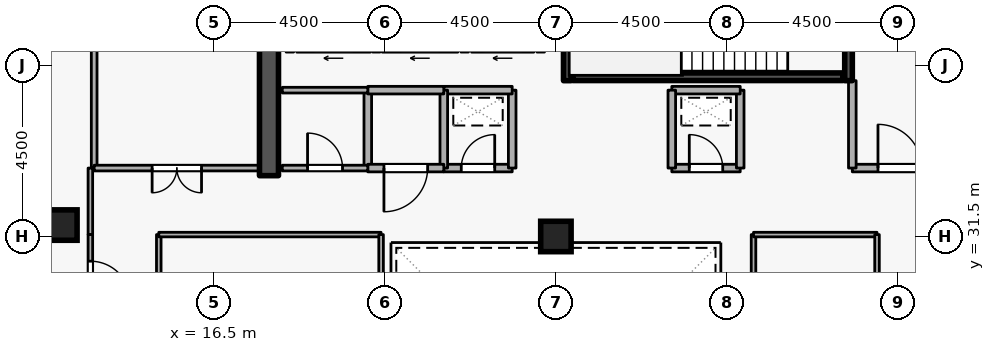
"""IFC4 building model, lengths in metres.
Left out: names, types, materials, properties, quantities, classifications, styles, units other than length and angle.
Written with IfcOpenShell. Run it as: python <this file> out.ifc"""

import sys

from ifc_helpers import new_model, si_unit, direction, frame, frame_2d, origin, origin_2d, place, context, subcontext, project, spatial, rectangle, extrude, element, fill, save


model = new_model("IFC4")
c1 = context("Model", 3, precision=1e-05, world=origin(), true_north=direction((0.0, 1.0)))
c2 = subcontext(c1, "Body", "Model", "MODEL_VIEW")
j1 = project(units=[si_unit("LENGTHUNIT", "METRE"), si_unit("PLANEANGLEUNIT", "RADIAN")], contexts=[c1])
p1 = place(None, origin())
s1 = spatial("IfcSite", under=j1, at=p1, CompositionType="ELEMENT")
p2 = place(p1, origin())
s2 = spatial("IfcBuilding", under=s1, at=p2, CompositionType="ELEMENT")
p3 = place(p2, frame((0.0, 0.0, 258.3)))
s3 = spatial("IfcBuildingStorey", under=s2, at=p3, CompositionType="ELEMENT", Elevation=258.3)
p4 = place(p3, frame((17.95, 33.1, 0.0), z_axis=(0.0, 0.0, 1.0), x_axis=(0.0, 1.0, 0.0)))
e1 = element("IfcWall", 1, at=p4, inside=s3, PredefinedType="SHEAR", context=c2, shape_type="SweptSolid", body=[
    extrude(rectangle(XDim=5.8, YDim=0.5, at=frame_2d((2.9, 0.0))), origin(), (0.0, 0.0, 1.0), 3.6),
])
for number, where, z_axis, x_axis in (
    (2, (12.5, 31.8, 0.0), (0.0, 0.0, 1.0), (1.0, 0.0, 0.0)),
    (3, (25.5, 31.5, 0.0), (0.0, 0.0, 1.0), (1.0, 0.0, 0.0)),
):
    element("IfcColumn", number, at=place(p3, frame(where, z_axis=z_axis, x_axis=x_axis)), inside=s3, PredefinedType="COLUMN", context=c2, shape_type="SweptSolid", body=[
        extrude(rectangle(XDim=0.8, YDim=0.8, at=origin_2d()), origin(), (0.0, 0.0, 1.0), 3.6),
    ])
p5 = place(p3, frame((24.92, 36.45, 0.0), z_axis=(0.0, 0.0, 1.0), x_axis=(-1.0, 0.0, 0.0)))
e4 = element("IfcWall", 4, at=p5, inside=s3, PredefinedType="STANDARD", context=c2, shape_type="SweptSolid", body=[
    extrude(rectangle(XDim=1.64, YDim=0.2, at=frame_2d((0.82, 0.0))), origin(), (0.0, 0.0, 1.0), 3.34),
])
p6 = place(p5, frame((0.31, 0.0, 0.0)))
e5 = element("IfcOpeningElement", 5, at=p6, cuts=e4, PredefinedType="OPENING", context=c2, shape_type="SweptSolid", body=[
    extrude(rectangle(XDim=1.02, YDim=2.06, at=frame_2d((0.51, 1.03))), frame((0.0, 0.11, 0.0), z_axis=(0.0, -1.0, 0.0), x_axis=(1.0, 0.0, 0.0)), (0.0, 0.0, 1.0), 0.22),
])
p7 = place(p3, frame((22.92, 36.45, 0.0), z_axis=(0.0, 0.0, 1.0), x_axis=(-1.0, 0.0, 0.0)))
e6 = element("IfcWall", 6, at=p7, inside=s3, PredefinedType="STANDARD", context=c2, shape_type="SweptSolid", body=[
    extrude(rectangle(XDim=1.99, YDim=0.2, at=frame_2d((0.995, 0.0))), origin(), (0.0, 0.0, 1.0), 3.34),
])
p8 = place(p7, frame((0.485, 0.0, 0.0)))
e7 = element("IfcOpeningElement", 7, at=p8, cuts=e6, PredefinedType="OPENING", context=c2, shape_type="SweptSolid", body=[
    extrude(rectangle(XDim=1.02, YDim=2.06, at=frame_2d((0.51, 1.03))), frame((0.0, 0.11, 0.0), z_axis=(0.0, -1.0, 0.0), x_axis=(1.0, 0.0, 0.0)), (0.0, 0.0, 1.0), 0.22),
])
p9 = place(p3, frame((20.62, 36.45, 0.0), z_axis=(0.0, 0.0, 1.0), x_axis=(-1.0, 0.0, 0.0)))
e8 = element("IfcWall", 8, at=p9, inside=s3, PredefinedType="STANDARD", context=c2, shape_type="SweptSolid", body=[
    extrude(rectangle(XDim=1.94, YDim=0.2, at=frame_2d((0.97, 0.0))), origin(), (0.0, 0.0, 1.0), 3.34),
])
p10 = place(p9, frame((0.46, 0.0, 0.0)))
e9 = element("IfcOpeningElement", 9, at=p10, cuts=e8, PredefinedType="OPENING", context=c2, shape_type="SweptSolid", body=[
    extrude(rectangle(XDim=1.02, YDim=2.06, at=frame_2d((0.51, 1.03))), frame((0.0, 0.11, 0.0), z_axis=(0.0, -1.0, 0.0), x_axis=(1.0, 0.0, 0.0)), (0.0, 0.0, 1.0), 0.22),
])
p11 = place(p3, frame((33.2, 38.95, 0.0), z_axis=(0.0, 0.0, 1.0), x_axis=(0.0, -1.0, 0.0)))
e10 = element("IfcWall", 10, at=p11, inside=s3, PredefinedType="SHEAR", context=c2, shape_type="SweptSolid", body=[
    extrude(rectangle(XDim=3.35, YDim=0.2, at=frame_2d((1.675, 0.0))), origin(), (0.0, 0.0, 1.0), 3.6),
])
p12 = place(p11, frame((1.125, 0.0, 0.0)))
e11 = element("IfcOpeningElement", 11, at=p12, cuts=e10, PredefinedType="OPENING", context=c2, shape_type="SweptSolid", body=[
    extrude(rectangle(XDim=1.1, YDim=2.1, at=frame_2d((0.55, 1.05))), frame((0.0, 0.11, 0.0), z_axis=(0.0, -1.0, 0.0), x_axis=(1.0, 0.0, 0.0)), (0.0, 0.0, 1.0), 0.22),
])
p13 = place(p3, frame((25.8, 35.6, 0.0), z_axis=(0.0, 0.0, 1.0), x_axis=(0.0, 1.0, 0.0)))
e12 = element("IfcWall", 12, at=p13, inside=s3, PredefinedType="SHEAR", context=c2, shape_type="SweptSolid", body=[
    extrude(rectangle(XDim=3.35, YDim=0.2, at=frame_2d((1.675, 0.0))), origin(), (0.0, 0.0, 1.0), 3.6),
])
p14 = place(p3, frame((25.95, 35.703, 0.0), z_axis=(0.0, 0.0, 1.0), x_axis=(1.0, 0.0, 0.0)))
e13 = element("IfcWall", 13, at=p14, inside=s3, PredefinedType="SHEAR", context=c2, shape_type="SweptSolid", body=[
    extrude(rectangle(XDim=7.1, YDim=0.2, at=frame_2d((3.55, 0.0))), origin(), (0.0, 0.0, 1.0), 3.6),
])
p15 = place(p3, frame((33.3, 33.3, 0.0), z_axis=(0.0, 0.0, 1.0), x_axis=(1.0, 0.0, 0.0)))
e14 = element("IfcWall", 14, at=p15, inside=s3, PredefinedType="STANDARD", context=c2, shape_type="SweptSolid", body=[
    extrude(rectangle(XDim=2.5, YDim=0.2, at=frame_2d((1.25, 0.0))), origin(), (0.0, 0.0, 1.0), 3.34),
])
p16 = place(p15, frame((0.675, 0.0, 0.0)))
e15 = element("IfcOpeningElement", 15, at=p16, cuts=e14, PredefinedType="OPENING", context=c2, shape_type="SweptSolid", body=[
    extrude(rectangle(XDim=1.15, YDim=2.1, at=frame_2d((0.575, 1.05))), frame((0.0, 0.11, 0.0), z_axis=(0.0, -1.0, 0.0), x_axis=(1.0, 0.0, 0.0)), (0.0, 0.0, 1.0), 0.22),
])
p17 = place(p3, frame((33.3, 35.6, 0.0), z_axis=(0.0, 0.0, 1.0), x_axis=(0.0, -1.0, 0.0)))
e16 = element("IfcWall", 16, at=p17, inside=s3, PredefinedType="STANDARD", context=c2, shape_type="SweptSolid", body=[
    extrude(rectangle(XDim=2.3, YDim=0.2, at=frame_2d((1.15, 0.0))), origin(), (0.0, 0.0, 1.0), 2.545),
])
p18 = place(p3, frame((22.55, 33.3, 0.0), z_axis=(0.0, 0.0, 1.0), x_axis=(1.0, 0.0, 0.0)))
e17 = element("IfcWall", 17, at=p18, inside=s3, PredefinedType="STANDARD", context=c2, shape_type="SweptSolid", body=[
    extrude(rectangle(XDim=1.8, YDim=0.2, at=frame_2d((0.9, 0.0))), origin(), (0.0, 0.0, 1.0), 3.34),
])
p19 = place(p18, frame((0.46, 0.0, 0.0)))
e18 = element("IfcOpeningElement", 18, at=p19, cuts=e17, PredefinedType="OPENING", context=c2, shape_type="SweptSolid", body=[
    extrude(rectangle(XDim=0.88, YDim=2.04, at=frame_2d((0.44, 1.02))), frame((0.0, 0.11, 0.0), z_axis=(0.0, -1.0, 0.0), x_axis=(1.0, 0.0, 0.0)), (0.0, 0.0, 1.0), 0.22),
])
p20 = place(p3, frame((24.35, 33.3, 0.0), z_axis=(0.0, 0.0, 1.0), x_axis=(0.0, 1.0, 0.0)))
e19 = element("IfcWall", 19, at=p20, inside=s3, PredefinedType="STANDARD", context=c2, shape_type="SweptSolid", body=[
    extrude(rectangle(XDim=2.05, YDim=0.2, at=frame_2d((1.025, 0.0))), origin(), (0.0, 0.0, 1.0), 3.34),
])
p21 = place(p3, frame((24.35, 35.35, 0.0), z_axis=(0.0, 0.0, 1.0), x_axis=(-1.0, 0.0, 0.0)))
e20 = element("IfcWall", 20, at=p21, inside=s3, PredefinedType="STANDARD", context=c2, shape_type="SweptSolid", body=[
    extrude(rectangle(XDim=1.8, YDim=0.2, at=frame_2d((0.9, 0.0))), origin(), (0.0, 0.0, 1.0), 3.34),
])
p22 = place(p3, frame((22.55, 35.35, 0.0), z_axis=(0.0, 0.0, 1.0), x_axis=(0.0, -1.0, 0.0)))
e21 = element("IfcWall", 21, at=p22, inside=s3, PredefinedType="STANDARD", context=c2, shape_type="SweptSolid", body=[
    extrude(rectangle(XDim=2.05, YDim=0.2, at=frame_2d((1.025, 0.0))), origin(), (0.0, 0.0, 1.0), 3.34),
])
p23 = place(p3, frame((28.55, 33.3, 0.0), z_axis=(0.0, 0.0, 1.0), x_axis=(1.0, 0.0, 0.0)))
e22 = element("IfcWall", 22, at=p23, inside=s3, PredefinedType="STANDARD", context=c2, shape_type="SweptSolid", body=[
    extrude(rectangle(XDim=1.8, YDim=0.2, at=frame_2d((0.9, 0.0))), origin(), (0.0, 0.0, 1.0), 3.34),
])
p24 = place(p23, frame((0.46, 0.0, 0.0)))
e23 = element("IfcOpeningElement", 23, at=p24, cuts=e22, PredefinedType="OPENING", context=c2, shape_type="SweptSolid", body=[
    extrude(rectangle(XDim=0.88, YDim=2.04, at=frame_2d((0.44, 1.02))), frame((0.0, 0.11, 0.0), z_axis=(0.0, -1.0, 0.0), x_axis=(1.0, 0.0, 0.0)), (0.0, 0.0, 1.0), 0.22),
])
p25 = place(p3, frame((30.35, 33.3, 0.0), z_axis=(0.0, 0.0, 1.0), x_axis=(0.0, 1.0, 0.0)))
e24 = element("IfcWall", 24, at=p25, inside=s3, PredefinedType="STANDARD", context=c2, shape_type="SweptSolid", body=[
    extrude(rectangle(XDim=2.05, YDim=0.2, at=frame_2d((1.025, 0.0))), origin(), (0.0, 0.0, 1.0), 3.34),
])
p26 = place(p3, frame((30.35, 35.35, 0.0), z_axis=(0.0, 0.0, 1.0), x_axis=(-1.0, 0.0, 0.0)))
e25 = element("IfcWall", 25, at=p26, inside=s3, PredefinedType="STANDARD", context=c2, shape_type="SweptSolid", body=[
    extrude(rectangle(XDim=1.8, YDim=0.2, at=frame_2d((0.9, 0.0))), origin(), (0.0, 0.0, 1.0), 3.34),
])
for number, where, z_axis, x_axis in (
    (26, (28.55, 35.35, 0.0), (0.0, 0.0, 1.0), (0.0, -1.0, 0.0)),
    (27, (20.55, 33.3, 0.0), (0.0, 0.0, 1.0), (0.0, 1.0, 0.0)),
):
    element("IfcWall", number, at=place(p3, frame(where, z_axis=z_axis, x_axis=x_axis)), inside=s3, PredefinedType="STANDARD", context=c2, shape_type="SweptSolid", body=[
        extrude(rectangle(XDim=2.05, YDim=0.2, at=frame_2d((1.025, 0.0))), origin(), (0.0, 0.0, 1.0), 3.34),
    ])
p27 = place(p3, frame((20.55, 35.35, 0.0), z_axis=(0.0, 0.0, 1.0), x_axis=(1.0, 0.0, 0.0)))
e28 = element("IfcWall", 28, at=p27, inside=s3, PredefinedType="STANDARD", context=c2, shape_type="SweptSolid", body=[
    extrude(rectangle(XDim=2.0, YDim=0.2, at=frame_2d((1.0, 0.0))), origin(), (0.0, 0.0, 1.0), 3.34),
])
p28 = place(p3, frame((22.55, 33.3, 0.0), z_axis=(0.0, 0.0, 1.0), x_axis=(-1.0, 0.0, 0.0)))
e29 = element("IfcWall", 29, at=p28, inside=s3, PredefinedType="STANDARD", context=c2, shape_type="SweptSolid", body=[
    extrude(rectangle(XDim=2.0, YDim=0.2, at=frame_2d((1.0, 0.0))), origin(), (0.0, 0.0, 1.0), 3.34),
])
p29 = place(p28, frame((0.425, 0.0, 0.0)))
e30 = element("IfcOpeningElement", 30, at=p29, cuts=e29, PredefinedType="OPENING", context=c2, shape_type="SweptSolid", body=[
    extrude(rectangle(XDim=1.15, YDim=2.1, at=frame_2d((0.575, 1.05))), frame((0.0, 0.11, 0.0), z_axis=(0.0, -1.0, 0.0), x_axis=(1.0, 0.0, 0.0)), (0.0, 0.0, 1.0), 0.22),
])
p30 = place(p3, frame((18.3, 33.3, 0.0), z_axis=(0.0, 0.0, 1.0), x_axis=(1.0, 0.0, 0.0)))
e31 = element("IfcWall", 31, at=p30, inside=s3, PredefinedType="PARTITIONING", context=c2, shape_type="SweptSolid", body=[
    extrude(rectangle(XDim=2.25, YDim=0.15, at=frame_2d((1.125, 0.0))), origin(), (0.0, 0.0, 1.0), 3.34),
])
p31 = place(p30, frame((0.665, 0.0, 0.0)))
e32 = element("IfcOpeningElement", 32, at=p31, cuts=e31, PredefinedType="OPENING", context=c2, shape_type="SweptSolid", body=[
    extrude(rectangle(XDim=0.92, YDim=2.08, at=frame_2d((0.46, 1.04))), frame((0.0, 0.085, 0.0), z_axis=(0.0, -1.0, 0.0), x_axis=(1.0, 0.0, 0.0)), (0.0, 0.0, 1.0), 0.17),
])
p32 = place(p3, frame((20.55, 35.35, 0.0), z_axis=(0.0, 0.0, 1.0), x_axis=(-1.0, 0.0, 0.0)))
e33 = element("IfcWall", 33, at=p32, inside=s3, PredefinedType="PARTITIONING", context=c2, shape_type="SweptSolid", body=[
    extrude(rectangle(XDim=2.25, YDim=0.15, at=frame_2d((1.125, 0.0))), origin(), (0.0, 0.0, 1.0), 3.34),
])
p33 = place(p3, frame((13.35, 33.3, 0.0), z_axis=(0.0, 0.0, 1.0), x_axis=(0.0, 1.0, 0.0)))
e34 = element("IfcWall", 34, at=p33, inside=s3, PredefinedType="PARTITIONING", context=c2, shape_type="SweptSolid", body=[
    extrude(rectangle(XDim=11.42, YDim=0.15, at=frame_2d((5.71, 0.0))), origin(), (0.0, 0.0, 1.0), 3.34),
])
p34 = place(p3, frame((17.7, 33.3, 0.0), z_axis=(0.0, 0.0, 1.0), x_axis=(-1.0, 0.0, 0.0)))
e35 = element("IfcWall", 35, at=p34, inside=s3, PredefinedType="PARTITIONING", context=c2, shape_type="SweptSolid", body=[
    extrude(rectangle(XDim=4.35, YDim=0.15, at=frame_2d((2.175, 0.0))), origin(), (0.0, 0.0, 1.0), 3.34),
])
p35 = place(p34, frame((1.525, 0.0, 0.0)))
e36 = element("IfcOpeningElement", 36, at=p35, cuts=e35, PredefinedType="OPENING", context=c2, shape_type="SweptSolid", body=[
    extrude(rectangle(XDim=1.3, YDim=2.12, at=frame_2d((0.65, 1.06))), frame((0.0, 0.085, 0.0), z_axis=(0.0, -1.0, 0.0), x_axis=(1.0, 0.0, 0.0)), (0.0, 0.0, 1.0), 0.17),
])
p36 = place(p3, frame((13.25, 33.3, 0.0), z_axis=(0.0, 0.0, 1.0), x_axis=(0.0, -1.0, 0.0)))
e37 = element("IfcWall", 37, at=p36, inside=s3, PredefinedType="PARTITIONING", context=c2, shape_type="SweptSolid", body=[
    extrude(rectangle(XDim=1.75, YDim=0.12, at=frame_2d((0.875, 0.0))), origin(), (0.0, 0.0, 1.0), 3.34),
])
p37 = place(p3, frame((13.25, 31.55, 0.0), z_axis=(0.0, 0.0, 1.0), x_axis=(0.0, -1.0, 0.0)))
e38 = element("IfcWall", 38, at=p37, inside=s3, PredefinedType="PARTITIONING", context=c2, shape_type="SweptSolid", body=[
    extrude(rectangle(XDim=2.45, YDim=0.12, at=frame_2d((1.225, 0.0))), origin(), (0.0, 0.0, 1.0), 3.34),
])
p38 = place(p37, frame((0.7, 0.0, 0.0)))
e39 = element("IfcOpeningElement", 39, at=p38, cuts=e38, PredefinedType="OPENING", context=c2, shape_type="SweptSolid", body=[
    extrude(rectangle(XDim=1.05, YDim=2.1, at=frame_2d((0.525, 1.05))), frame((0.0, 0.07, 0.0), z_axis=(0.0, -1.0, 0.0), x_axis=(1.0, 0.0, 0.0)), (0.0, 0.0, 1.0), 0.14),
])
p39 = place(p3, frame((15.05, 22.45, 0.0), z_axis=(0.0, 0.0, 1.0), x_axis=(0.0, 1.0, 0.0)))
e40 = element("IfcWall", 40, at=p39, inside=s3, PredefinedType="PARTITIONING", context=c2, shape_type="SweptSolid", body=[
    extrude(rectangle(XDim=9.1, YDim=0.12, at=frame_2d((4.55, 0.0))), origin(), (0.0, 0.0, 1.0), 3.34),
])
p40 = place(p39, frame((4.075, 0.0, 0.0)))
e41 = element("IfcOpeningElement", 41, at=p40, cuts=e40, PredefinedType="OPENING", context=c2, shape_type="SweptSolid", body=[
    extrude(rectangle(XDim=0.95, YDim=2.1, at=frame_2d((0.475, 1.05))), frame((0.0, 0.07, 0.0), z_axis=(0.0, -1.0, 0.0), x_axis=(1.0, 0.0, 0.0)), (0.0, 0.0, 1.0), 0.14),
])
p41 = place(p3, frame((15.05, 31.55, 0.0), z_axis=(0.0, 0.0, 1.0), x_axis=(1.0, 0.0, 0.0)))
e42 = element("IfcWall", 42, at=p41, inside=s3, PredefinedType="PARTITIONING", context=c2, shape_type="SweptSolid", body=[
    extrude(rectangle(XDim=5.85, YDim=0.12, at=frame_2d((2.925, 0.0))), origin(), (0.0, 0.0, 1.0), 3.34),
])
for number, where, z_axis, x_axis in (
    (43, (20.9, 31.55, 0.0), (0.0, 0.0, 1.0), (0.0, -1.0, 0.0)),
    (44, (30.7, 22.45, 0.0), (0.0, 0.0, 1.0), (0.0, 1.0, 0.0)),
):
    element("IfcWall", number, at=place(p3, frame(where, z_axis=z_axis, x_axis=x_axis)), inside=s3, PredefinedType="PARTITIONING", context=c2, shape_type="SweptSolid", body=[
        extrude(rectangle(XDim=9.1, YDim=0.12, at=frame_2d((4.55, 0.0))), origin(), (0.0, 0.0, 1.0), 3.34),
    ])
p42 = place(p3, frame((30.7, 31.55, 0.0), z_axis=(0.0, 0.0, 1.0), x_axis=(1.0, 0.0, 0.0)))
e45 = element("IfcWall", 45, at=p42, inside=s3, PredefinedType="PARTITIONING", context=c2, shape_type="SweptSolid", body=[
    extrude(rectangle(XDim=3.25, YDim=0.12, at=frame_2d((1.625, 0.0))), origin(), (0.0, 0.0, 1.0), 3.34),
])
p43 = place(p3, frame((33.95, 31.55, 0.0), z_axis=(0.0, 0.0, 1.0), x_axis=(0.0, -1.0, 0.0)))
e46 = element("IfcWall", 46, at=p43, inside=s3, PredefinedType="PARTITIONING", context=c2, shape_type="SweptSolid", body=[
    extrude(rectangle(XDim=9.1, YDim=0.12, at=frame_2d((4.55, 0.0))), origin(), (0.0, 0.0, 1.0), 3.34),
])
p44 = place(p43, frame((4.075, 0.0, 0.0)))
e47 = element("IfcOpeningElement", 47, at=p44, cuts=e46, PredefinedType="OPENING", context=c2, shape_type="SweptSolid", body=[
    extrude(rectangle(XDim=0.95, YDim=2.1, at=frame_2d((0.475, 1.05))), frame((0.0, 0.07, 0.0), z_axis=(0.0, -1.0, 0.0), x_axis=(1.0, 0.0, 0.0)), (0.0, 0.0, 1.0), 0.14),
])
p45 = place(p16, origin())
e48 = element("IfcDoor", 48, at=p45, inside=s3, OperationType="SINGLE_SWING_LEFT", PredefinedType="DOOR", context=c2, shape_type="SweptSolid", body=[
    extrude(rectangle(XDim=1.15, YDim=2.1, at=frame_2d((0.575, 1.05))), frame((0.0, 0.025, 0.0), z_axis=(0.0, -1.0, 0.0), x_axis=(1.0, 0.0, 0.0)), (0.0, 0.0, 1.0), 0.05),
])
fill(e15, e48)
p46 = place(p19, origin())
e49 = element("IfcDoor", 49, at=p46, inside=s3, OperationType="SINGLE_SWING_RIGHT", PredefinedType="DOOR", context=c2, shape_type="SweptSolid", body=[
    extrude(rectangle(XDim=0.88, YDim=2.04, at=frame_2d((0.44, 1.02))), frame((0.0, 0.025, 0.0), z_axis=(0.0, -1.0, 0.0), x_axis=(1.0, 0.0, 0.0)), (0.0, 0.0, 1.0), 0.05),
])
fill(e18, e49)
p47 = place(p24, origin())
e50 = element("IfcDoor", 50, at=p47, inside=s3, OperationType="SINGLE_SWING_LEFT", PredefinedType="DOOR", context=c2, shape_type="SweptSolid", body=[
    extrude(rectangle(XDim=0.88, YDim=2.04, at=frame_2d((0.44, 1.02))), frame((0.0, 0.025, 0.0), z_axis=(0.0, -1.0, 0.0), x_axis=(1.0, 0.0, 0.0)), (0.0, 0.0, 1.0), 0.05),
])
fill(e23, e50)
p48 = place(p31, origin())
e51 = element("IfcDoor", 51, at=p48, inside=s3, OperationType="SINGLE_SWING_LEFT", PredefinedType="DOOR", context=c2, shape_type="SweptSolid", body=[
    extrude(rectangle(XDim=0.92, YDim=2.08, at=frame_2d((0.46, 1.04))), frame((0.0, 0.025, 0.0), z_axis=(0.0, -1.0, 0.0), x_axis=(1.0, 0.0, 0.0)), (0.0, 0.0, 1.0), 0.05),
])
fill(e32, e51)
p49 = place(p29, origin())
e52 = element("IfcDoor", 52, at=p49, inside=s3, OperationType="SINGLE_SWING_RIGHT", PredefinedType="DOOR", context=c2, shape_type="SweptSolid", body=[
    extrude(rectangle(XDim=1.15, YDim=2.1, at=frame_2d((0.575, 1.05))), frame((0.0, 0.025, 0.0), z_axis=(0.0, -1.0, 0.0), x_axis=(1.0, 0.0, 0.0)), (0.0, 0.0, 1.0), 0.05),
])
fill(e30, e52)
p50 = place(p35, origin())
e53 = element("IfcDoor", 53, at=p50, inside=s3, OperationType="DOUBLE_DOOR_SINGLE_SWING", PredefinedType="DOOR", context=c2, shape_type="SweptSolid", body=[
    extrude(rectangle(XDim=1.3, YDim=2.12, at=frame_2d((0.65, 1.06))), frame((0.0, 0.025, 0.0), z_axis=(0.0, -1.0, 0.0), x_axis=(1.0, 0.0, 0.0)), (0.0, 0.0, 1.0), 0.05),
])
fill(e36, e53)
p51 = place(p38, origin())
e54 = element("IfcDoor", 54, at=p51, inside=s3, OperationType="SINGLE_SWING_RIGHT", PredefinedType="DOOR", context=c2, shape_type="SweptSolid", body=[
    extrude(rectangle(XDim=1.05, YDim=2.1, at=frame_2d((0.525, 1.05))), frame((0.0, 0.025, 0.0), z_axis=(0.0, -1.0, 0.0), x_axis=(1.0, 0.0, 0.0)), (0.0, 0.0, 1.0), 0.05),
])
fill(e39, e54)
save(model, sys.argv[1])
